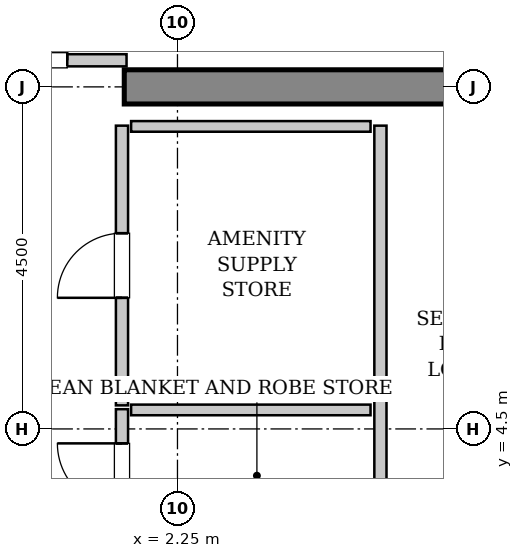
"""IFC4 building model, lengths in metres.
Left out: names, types, materials, properties, quantities, classifications, styles, units other than length and angle.
Written with IfcOpenShell. Run it as: python <this file> out.ifc"""

import sys

from ifc_helpers import new_model, si_unit, direction, frame, frame_2d, origin, place, context, subcontext, project, spatial, rectangle, extrude, source, transform, mapped, element, fill, save


model = new_model("IFC4")
c1 = context("Model", 3, precision=1e-05, world=origin(), true_north=direction((0.0, 1.0)))
c2 = subcontext(c1, "Body", "Model", "MODEL_VIEW")
j1 = project(units=[si_unit("LENGTHUNIT", "METRE"), si_unit("PLANEANGLEUNIT", "RADIAN")], contexts=[c1])
p1 = place(None, origin())
s1 = spatial("IfcSite", under=j1, at=p1, CompositionType="ELEMENT")
p2 = place(p1, origin())
s2 = spatial("IfcBuilding", under=s1, at=p2, CompositionType="ELEMENT")
p3 = place(p2, frame((0.0, 0.0, 310.2)))
s3 = spatial("IfcBuildingStorey", under=s2, at=p3, CompositionType="ELEMENT", Elevation=310.2)
m1 = source(origin(), c2, "Body", "SweptSolid", [
    extrude(rectangle(XDim=9.925, YDim=0.45, at=frame_2d((4.962, 0.0))), origin(), (0.0, 0.0, 1.0), 3.8),
])
p4 = place(p3, frame((1.55, 9.0, 0.0), z_axis=(0.0, 0.0, 1.0), x_axis=(1.0, 0.0, 0.0)))
e1 = element("IfcWall", 1, at=p4, inside=s3, PredefinedType="SHEAR", context=c2, shape_type="MappedRepresentation", body=[
    mapped(m1, transform((0.0, 0.0, 0.0), x_axis=(1.0, 0.0, 0.0), y_axis=(0.0, 1.0, 0.0), z_axis=(0.0, 0.0, 1.0), scale=1.0)),
])
m2 = source(origin(), c2, "Body", "SweptSolid", [
    extrude(rectangle(XDim=3.16, YDim=0.16, at=frame_2d((1.58, 0.0))), origin(), (0.0, 0.0, 1.0), 2.625),
])
p5 = place(p3, frame((-1.58, 9.35, 0.0), z_axis=(0.0, 0.0, 1.0), x_axis=(1.0, 0.0, 0.0)))
e2 = element("IfcWall", 2, at=p5, inside=s3, PredefinedType="PARTITIONING", context=c2, shape_type="MappedRepresentation", body=[
    mapped(m2, transform((0.0, 0.0, 0.0), x_axis=(1.0, 0.0, 0.0), y_axis=(0.0, 1.0, 0.0), z_axis=(0.0, 0.0, 1.0), scale=1.0)),
])
p6 = place(p5, frame((0.78, 0.0, 0.0)))
e3 = element("IfcOpeningElement", 3, at=p6, cuts=e2, PredefinedType="OPENING", context=c2, shape_type="SweptSolid", body=[
    extrude(rectangle(XDim=1.6, YDim=2.3, at=frame_2d((0.8, 1.15))), frame((0.0, 0.09, 0.0), z_axis=(0.0, -1.0, 0.0), x_axis=(1.0, 0.0, 0.0)), (0.0, 0.0, 1.0), 0.18),
])
m3 = source(origin(), c2, "Body", "SweptSolid", [
    extrude(rectangle(XDim=5.45, YDim=0.16, at=frame_2d((2.725, 0.0))), origin(), (0.0, 0.0, 1.0), 3.535),
])
p7 = place(p3, frame((4.92, 3.04, 0.0), z_axis=(0.0, 0.0, 1.0), x_axis=(0.0, 1.0, 0.0)))
e4 = element("IfcWall", 4, at=p7, inside=s3, PredefinedType="PARTITIONING", context=c2, shape_type="MappedRepresentation", body=[
    mapped(m3, transform((0.0, 0.0, 0.0), x_axis=(1.0, 0.0, 0.0), y_axis=(0.0, 1.0, 0.0), z_axis=(0.0, 0.0, 1.0), scale=1.0)),
])
m4 = source(origin(), c2, "Body", "SweptSolid", [
    extrude(rectangle(XDim=1.75, YDim=0.16, at=frame_2d((0.875, 0.0))), origin(), (0.0, 0.0, 1.0), 3.535),
])
p8 = place(p3, frame((1.52, 3.01, 0.0), z_axis=(0.0, 0.0, 1.0), x_axis=(0.0, 1.0, 0.0)))
e5 = element("IfcWall", 5, at=p8, inside=s3, PredefinedType="PARTITIONING", context=c2, shape_type="MappedRepresentation", body=[
    mapped(m4, transform((0.0, 0.0, 0.0), x_axis=(1.0, 0.0, 0.0), y_axis=(0.0, 1.0, 0.0), z_axis=(0.0, 0.0, 1.0), scale=1.0)),
])
p9 = place(p8, frame((0.45, 0.0, 0.0)))
e6 = element("IfcOpeningElement", 6, at=p9, cuts=e5, PredefinedType="OPENING", context=c2, shape_type="SweptSolid", body=[
    extrude(rectangle(XDim=0.85, YDim=2.1, at=frame_2d((0.425, 1.05))), frame((0.0, 0.09, 0.0), z_axis=(0.0, -1.0, 0.0), x_axis=(1.0, 0.0, 0.0)), (0.0, 0.0, 1.0), 0.18),
])
m5 = source(origin(), c2, "Body", "SweptSolid", [
    extrude(rectangle(XDim=3.15, YDim=0.14, at=frame_2d((1.575, 0.0))), origin(), (0.0, 0.0, 1.0), 3.535),
])
p10 = place(p3, frame((1.64, 4.75, 0.0), z_axis=(0.0, 0.0, 1.0), x_axis=(1.0, 0.0, 0.0)))
e7 = element("IfcWall", 7, at=p10, inside=s3, PredefinedType="PARTITIONING", context=c2, shape_type="MappedRepresentation", body=[
    mapped(m5, transform((0.0, 0.0, 0.0), x_axis=(1.0, 0.0, 0.0), y_axis=(0.0, 1.0, 0.0), z_axis=(0.0, 0.0, 1.0), scale=1.0)),
])
m6 = source(origin(), c2, "Body", "SweptSolid", [
    extrude(rectangle(XDim=3.68, YDim=0.16, at=frame_2d((1.84, 0.0))), origin(), (0.0, 0.0, 1.0), 3.535),
])
p11 = place(p3, frame((1.52, 4.81, 0.0), z_axis=(0.0, 0.0, 1.0), x_axis=(0.0, 1.0, 0.0)))
e8 = element("IfcWall", 8, at=p11, inside=s3, PredefinedType="PARTITIONING", context=c2, shape_type="MappedRepresentation", body=[
    mapped(m6, transform((0.0, 0.0, 0.0), x_axis=(1.0, 0.0, 0.0), y_axis=(0.0, 1.0, 0.0), z_axis=(0.0, 0.0, 1.0), scale=1.0)),
])
p12 = place(p11, frame((1.415, 0.0, 0.0)))
e9 = element("IfcOpeningElement", 9, at=p12, cuts=e8, PredefinedType="OPENING", context=c2, shape_type="SweptSolid", body=[
    extrude(rectangle(XDim=0.85, YDim=2.1, at=frame_2d((0.425, 1.05))), frame((0.0, 0.09, 0.0), z_axis=(0.0, -1.0, 0.0), x_axis=(1.0, 0.0, 0.0)), (0.0, 0.0, 1.0), 0.18),
])
p13 = place(p3, frame((1.64, 8.48, 0.0), z_axis=(0.0, 0.0, 1.0), x_axis=(1.0, 0.0, 0.0)))
e10 = element("IfcWall", 10, at=p13, inside=s3, PredefinedType="PARTITIONING", context=c2, shape_type="MappedRepresentation", body=[
    mapped(m5, transform((0.0, 0.0, 0.0), x_axis=(1.0, 0.0, 0.0), y_axis=(0.0, 1.0, 0.0), z_axis=(0.0, 0.0, 1.0), scale=1.0)),
])
m7 = source(origin(), c2, "Body", "SweptSolid", [
    extrude(rectangle(XDim=1.6, YDim=2.3, at=frame_2d((0.8, 1.15))), frame((0.0, 0.025, 0.0), z_axis=(0.0, -1.0, 0.0), x_axis=(1.0, 0.0, 0.0)), (0.0, 0.0, 1.0), 0.05),
])
p14 = place(p6, origin())
e11 = element("IfcDoor", 11, at=p14, inside=s3, OperationType="DOUBLE_DOOR_SINGLE_SWING", PredefinedType="DOOR", context=c2, shape_type="MappedRepresentation", body=[
    mapped(m7, transform((0.0, 0.0, 0.0), x_axis=(1.0, 0.0, 0.0), y_axis=(0.0, 1.0, 0.0), z_axis=(0.0, 0.0, 1.0), scale=1.0)),
])
fill(e3, e11)
m8 = source(origin(), c2, "Body", "SweptSolid", [
    extrude(rectangle(XDim=0.85, YDim=2.1, at=frame_2d((0.425, 1.05))), frame((0.0, 0.025, 0.0), z_axis=(0.0, -1.0, 0.0), x_axis=(1.0, 0.0, 0.0)), (0.0, 0.0, 1.0), 0.05),
])
p15 = place(p9, origin())
e12 = element("IfcDoor", 12, at=p15, inside=s3, OperationType="SINGLE_SWING_RIGHT", PredefinedType="DOOR", context=c2, shape_type="MappedRepresentation", body=[
    mapped(m8, transform((0.0, 0.0, 0.0), x_axis=(1.0, 0.0, 0.0), y_axis=(0.0, 1.0, 0.0), z_axis=(0.0, 0.0, 1.0), scale=1.0)),
])
fill(e6, e12)
p16 = place(p12, origin())
e13 = element("IfcDoor", 13, at=p16, inside=s3, OperationType="SINGLE_SWING_LEFT", PredefinedType="DOOR", context=c2, shape_type="MappedRepresentation", body=[
    mapped(m8, transform((0.0, 0.0, 0.0), x_axis=(1.0, 0.0, 0.0), y_axis=(0.0, 1.0, 0.0), z_axis=(0.0, 0.0, 1.0), scale=1.0)),
])
fill(e9, e13)
save(model, sys.argv[1])
